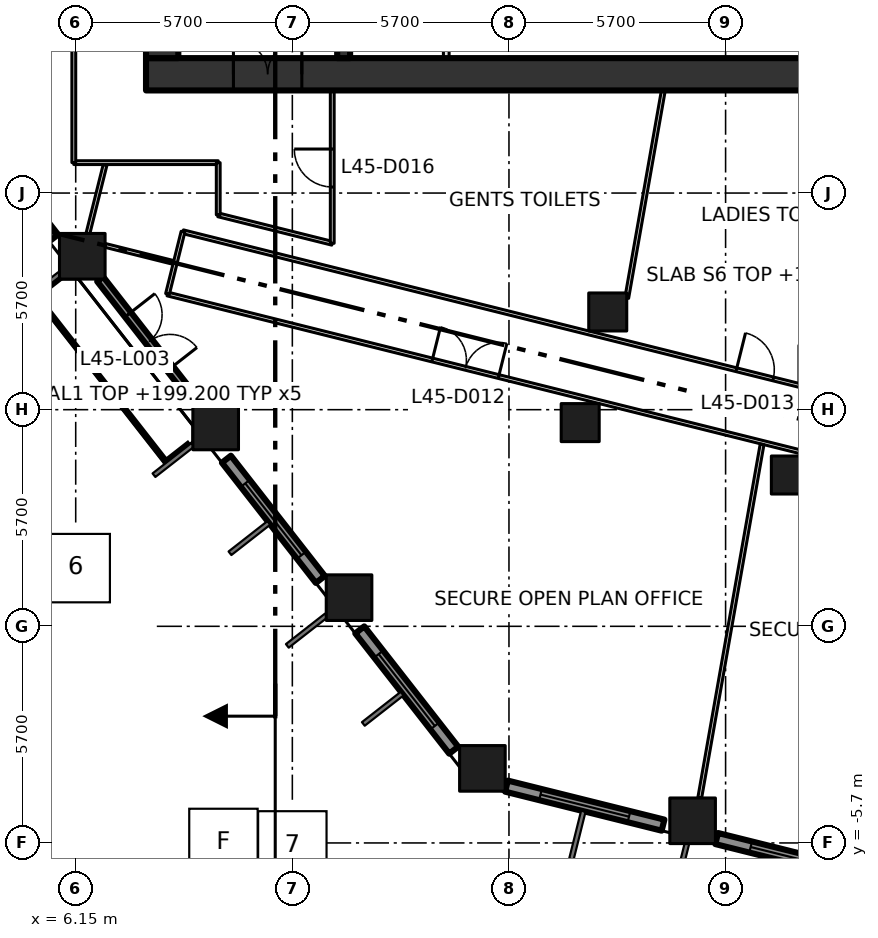
"""IFC4 building model, lengths in metres.
Left out: names, types, materials, properties, quantities, classifications, styles, units other than length and angle.
Written with IfcOpenShell. Run it as: python <this file> out.ifc"""

import sys

from ifc_helpers import new_model, si_unit, direction, frame, frame_2d, origin, origin_2d, place, context, subcontext, project, spatial, rectangle, extrude, element, fill, save


model = new_model("IFC4")
c1 = context("Model", 3, precision=1e-05, world=origin(), true_north=direction((0.0, 1.0)))
c2 = subcontext(c1, "Body", "Model", "MODEL_VIEW")
j1 = project(units=[si_unit("LENGTHUNIT", "METRE"), si_unit("PLANEANGLEUNIT", "RADIAN")], contexts=[c1])
p1 = place(None, origin())
s1 = spatial("IfcSite", under=j1, at=p1, CompositionType="ELEMENT")
p2 = place(p1, origin())
s2 = spatial("IfcBuilding", under=s1, at=p2, CompositionType="ELEMENT")
p3 = place(p2, frame((0.0, 0.0, 199.2)))
s3 = spatial("IfcBuildingStorey", under=s2, at=p3, CompositionType="ELEMENT", Elevation=199.2)
for number, where, z_axis, x_axis in (
    (1, (16.851, -3.738, 0.0), (0.0, 0.0, 1.0), (1.0, 0.0, 0.0)),
    (2, (13.342, 0.754, 0.0), (0.0, 0.0, 1.0), (1.0, 0.0, 0.0)),
    (3, (9.833, 5.245, 0.0), (0.0, 0.0, 1.0), (1.0, 0.0, 0.0)),
    (4, (6.323, 9.737, 0.0), (0.0, 0.0, 1.0), (1.0, 0.0, 0.0)),
    (5, (22.382, -5.117, 0.0), (0.0, 0.0, 1.0), (1.0, 0.0, 0.0)),
):
    element("IfcColumn", number, at=place(p3, frame(where, z_axis=z_axis, x_axis=x_axis)), inside=s3, PredefinedType="COLUMN", context=c2, shape_type="SweptSolid", body=[
        extrude(rectangle(XDim=1.2, YDim=1.2, at=origin_2d()), origin(), (0.0, 0.0, 1.0), 4.2),
    ])
for number, where, z_axis, x_axis in (
    (6, (19.424, 5.36, 0.0), (0.0, 0.0, 1.0), (1.0, 0.0, 0.0)),
    (7, (24.954, 3.981, 0.0), (0.0, 0.0, 1.0), (1.0, 0.0, 0.0)),
    (8, (20.149, 8.271, 0.0), (0.0, 0.0, 1.0), (1.0, 0.0, 0.0)),
):
    element("IfcColumn", number, at=place(p3, frame(where, z_axis=z_axis, x_axis=x_axis)), inside=s3, PredefinedType="COLUMN", context=c2, shape_type="SweptSolid", body=[
        extrude(rectangle(XDim=1.0, YDim=1.0, at=origin_2d()), origin(), (0.0, 0.0, 1.0), 4.2),
    ])
p4 = place(p3, frame((8.0, 14.525, -0.3), z_axis=(0.0, 0.0, 1.0), x_axis=(1.0, 0.0, 0.0)))
e9 = element("IfcWall", 9, at=p4, inside=s3, PredefinedType="SHEAR", context=c2, shape_type="SweptSolid", body=[
    extrude(rectangle(XDim=22.8, YDim=0.85, at=frame_2d((11.4, 0.0))), origin(), (0.0, 0.0, 1.0), 4.2),
])
p5 = place(p4, frame((2.3, 0.0, 0.3)))
e10 = element("IfcOpeningElement", 10, at=p5, cuts=e9, PredefinedType="OPENING", context=c2, shape_type="SweptSolid", body=[
    extrude(rectangle(XDim=1.8, YDim=2.1, at=frame_2d((0.9, 1.05))), frame((0.0, 0.435, 0.0), z_axis=(0.0, -1.0, 0.0), x_axis=(1.0, 0.0, 0.0)), (0.0, 0.0, 1.0), 0.87),
])
p6 = place(p3, frame((8.425, 14.95, -0.3), z_axis=(0.0, 0.0, 1.0), x_axis=(0.0, 1.0, 0.0)))
e11 = element("IfcWall", 11, at=p6, inside=s3, PredefinedType="SHEAR", context=c2, shape_type="SweptSolid", body=[
    extrude(rectangle(XDim=20.75, YDim=0.85, at=frame_2d((10.375, 0.0))), origin(), (0.0, 0.0, 1.0), 4.2),
])
p7 = place(p3, frame((13.2, 14.95, 0.0), z_axis=(0.0, 0.0, 1.0), x_axis=(0.0, 1.0, 0.0)))
e12 = element("IfcWall", 12, at=p7, inside=s3, PredefinedType="SHEAR", context=c2, shape_type="SweptSolid", body=[
    extrude(rectangle(XDim=20.75, YDim=0.34, at=frame_2d((10.375, 0.0))), origin(), (0.0, 0.0, 1.0), 3.9),
])
p8 = place(p7, frame((3.35, 0.0, 0.0)))
e13 = element("IfcOpeningElement", 13, at=p8, cuts=e12, PredefinedType="OPENING", context=c2, shape_type="SweptSolid", body=[
    extrude(rectangle(XDim=1.8, YDim=2.1, at=frame_2d((0.9, 1.05))), frame((0.0, 0.18, 0.0), z_axis=(0.0, -1.0, 0.0), x_axis=(1.0, 0.0, 0.0)), (0.0, 0.0, 1.0), 0.36),
])
p9 = place(p7, frame((11.45, 0.0, 0.0)))
e14 = element("IfcOpeningElement", 14, at=p9, cuts=e12, PredefinedType="OPENING", context=c2, shape_type="SweptSolid", body=[
    extrude(rectangle(XDim=1.2, YDim=2.1, at=frame_2d((0.6, 1.05))), frame((0.0, 0.18, 0.0), z_axis=(0.0, -1.0, 0.0), x_axis=(1.0, 0.0, 0.0)), (0.0, 0.0, 1.0), 0.36),
])
p10 = place(p3, frame((15.9, 14.95, 0.0), z_axis=(0.0, 0.0, 1.0), x_axis=(0.0, 1.0, 0.0)))
e15 = element("IfcWall", 15, at=p10, inside=s3, PredefinedType="PARTITIONING", context=c2, shape_type="SweptSolid", body=[
    extrude(rectangle(XDim=2.675, YDim=0.15, at=frame_2d((1.337, 0.0))), origin(), (0.0, 0.0, 1.0), 3.9),
])
p11 = place(p3, frame((3.096, 13.381, 0.0), z_axis=(0.0, 0.0, 1.0), x_axis=(0.615563820493, -0.78808704018, 0.0)))
e16 = element("IfcWall", 16, at=p11, inside=s3, PredefinedType="SOLIDWALL", context=c2, shape_type="SweptSolid", body=[
    extrude(rectangle(XDim=4.016, YDim=0.3, at=frame_2d((2.008, 0.0))), origin(), (0.0, 0.0, 1.0), 3.15),
])
p12 = place(p11, frame((0.808, 0.0, 0.8)))
e17 = element("IfcOpeningElement", 17, at=p12, cuts=e16, PredefinedType="OPENING", context=c2, shape_type="SweptSolid", body=[
    extrude(rectangle(XDim=2.4, YDim=2.1, at=frame_2d((1.2, 1.05))), frame((0.0, 0.16, 0.0), z_axis=(0.0, -1.0, 0.0), x_axis=(1.0, 0.0, 0.0)), (0.0, 0.0, 1.0), 0.32),
])
p13 = place(p3, frame((6.793, 9.137, 0.0), z_axis=(0.0, 0.0, 1.0), x_axis=(0.615521537177, -0.788120065264, 0.0)))
e18 = element("IfcWall", 18, at=p13, inside=s3, PredefinedType="SOLIDWALL", context=c2, shape_type="SweptSolid", body=[
    extrude(rectangle(XDim=4.177, YDim=0.2, at=frame_2d((2.088, 0.0))), origin(), (0.0, 0.0, 1.0), 3.15),
])
p14 = place(p13, frame((1.188, 0.0, 0.0)))
e19 = element("IfcOpeningElement", 19, at=p14, cuts=e18, PredefinedType="OPENING", context=c2, shape_type="SweptSolid", body=[
    extrude(rectangle(XDim=1.8, YDim=2.9, at=frame_2d((0.9, 1.45))), frame((0.0, 0.11, 0.0), z_axis=(0.0, -1.0, 0.0), x_axis=(1.0, 0.0, 0.0)), (0.0, 0.0, 1.0), 0.22),
])
p15 = place(p3, frame((10.115, 4.397, 0.0), z_axis=(0.0, 0.0, 1.0), x_axis=(0.615644041972, -0.788024373725, 0.0)))
e20 = element("IfcWall", 20, at=p15, inside=s3, PredefinedType="SOLIDWALL", context=c2, shape_type="SweptSolid", body=[
    extrude(rectangle(XDim=4.015, YDim=0.3, at=frame_2d((2.008, 0.0))), origin(), (0.0, 0.0, 1.0), 3.15),
])
p16 = place(p15, frame((0.807, 0.0, 0.8)))
e21 = element("IfcOpeningElement", 21, at=p16, cuts=e20, PredefinedType="OPENING", context=c2, shape_type="SweptSolid", body=[
    extrude(rectangle(XDim=2.4, YDim=2.1, at=frame_2d((1.2, 1.05))), frame((0.0, 0.16, 0.0), z_axis=(0.0, -1.0, 0.0), x_axis=(1.0, 0.0, 0.0)), (0.0, 0.0, 1.0), 0.32),
])
p17 = place(p3, frame((13.624, -0.094, 0.0), z_axis=(0.0, 0.0, 1.0), x_axis=(0.615526062586, -0.7881165309, 0.0)))
e22 = element("IfcWall", 22, at=p17, inside=s3, PredefinedType="SOLIDWALL", context=c2, shape_type="SweptSolid", body=[
    extrude(rectangle(XDim=4.016, YDim=0.3, at=frame_2d((2.008, 0.0))), origin(), (0.0, 0.0, 1.0), 3.15),
])
p18 = place(p17, frame((0.808, 0.0, 0.8)))
e23 = element("IfcOpeningElement", 23, at=p18, cuts=e22, PredefinedType="OPENING", context=c2, shape_type="SweptSolid", body=[
    extrude(rectangle(XDim=2.4, YDim=2.1, at=frame_2d((1.2, 1.05))), frame((0.0, 0.16, 0.0), z_axis=(0.0, -1.0, 0.0), x_axis=(1.0, 0.0, 0.0)), (0.0, 0.0, 1.0), 0.32),
])
p19 = place(p3, frame((17.484, -4.205, 0.0), z_axis=(0.0, 0.0, 1.0), x_axis=(0.970318118028, -0.241832069473, 0.0)))
e24 = element("IfcWall", 24, at=p19, inside=s3, PredefinedType="SOLIDWALL", context=c2, shape_type="SweptSolid", body=[
    extrude(rectangle(XDim=4.246, YDim=0.3, at=frame_2d((2.123, 0.0))), origin(), (0.0, 0.0, 1.0), 3.15),
])
p20 = place(p19, frame((0.923, 0.0, 0.8)))
e25 = element("IfcOpeningElement", 25, at=p20, cuts=e24, PredefinedType="OPENING", context=c2, shape_type="SweptSolid", body=[
    extrude(rectangle(XDim=2.4, YDim=2.1, at=frame_2d((1.2, 1.05))), frame((0.0, 0.16, 0.0), z_axis=(0.0, -1.0, 0.0), x_axis=(1.0, 0.0, 0.0)), (0.0, 0.0, 1.0), 0.32),
])
p21 = place(p3, frame((23.015, -5.584, 0.0), z_axis=(0.0, 0.0, 1.0), x_axis=(0.970291164166, -0.241940192487, 0.0)))
e26 = element("IfcWall", 26, at=p21, inside=s3, PredefinedType="SOLIDWALL", context=c2, shape_type="SweptSolid", body=[
    extrude(rectangle(XDim=4.245, YDim=0.3, at=frame_2d((2.123, 0.0))), origin(), (0.0, 0.0, 1.0), 3.15),
])
p22 = place(p21, frame((0.922, 0.0, 0.8)))
e27 = element("IfcOpeningElement", 27, at=p22, cuts=e26, PredefinedType="OPENING", context=c2, shape_type="SweptSolid", body=[
    extrude(rectangle(XDim=2.4, YDim=2.1, at=frame_2d((1.2, 1.05))), frame((0.0, 0.16, 0.0), z_axis=(0.0, -1.0, 0.0), x_axis=(1.0, 0.0, 0.0)), (0.0, 0.0, 1.0), 0.32),
])
p23 = place(p3, frame((6.1, 12.2, 0.0), z_axis=(0.0, 0.0, 1.0), x_axis=(1.0, 0.0, 0.0)))
e28 = element("IfcWall", 28, at=p23, inside=s3, PredefinedType="PARTITIONING", context=c2, shape_type="SweptSolid", body=[
    extrude(rectangle(XDim=3.8, YDim=0.1, at=frame_2d((1.9, 0.0))), origin(), (0.0, 0.0, 1.0), 3.9),
])
p24 = place(p3, frame((6.1, 38.9, 0.0), z_axis=(0.0, 0.0, 1.0), x_axis=(0.0, -1.0, 0.0)))
e29 = element("IfcWall", 29, at=p24, inside=s3, PredefinedType="PARTITIONING", context=c2, shape_type="SweptSolid", body=[
    extrude(rectangle(XDim=26.7, YDim=0.1, at=frame_2d((13.35, 0.0))), origin(), (0.0, 0.0, 1.0), 3.9),
])
p25 = place(p24, frame((21.01, 0.0, 0.0)))
e30 = element("IfcOpeningElement", 30, at=p25, cuts=e29, PredefinedType="OPENING", context=c2, shape_type="SweptSolid", body=[
    extrude(rectangle(XDim=1.0, YDim=2.1, at=frame_2d((0.5, 1.05))), frame((0.0, 0.06, 0.0), z_axis=(0.0, -1.0, 0.0), x_axis=(1.0, 0.0, 0.0)), (0.0, 0.0, 1.0), 0.12),
])
p26 = place(p3, frame((8.565, 8.744, 0.0), z_axis=(0.0, 0.0, 1.0), x_axis=(0.970297321886, -0.241915495869, 0.0)))
e31 = element("IfcWall", 31, at=p26, inside=s3, PredefinedType="PARTITIONING", context=c2, shape_type="SweptSolid", body=[
    extrude(rectangle(XDim=56.974, YDim=0.1, at=frame_2d((28.487, 0.0))), origin(), (0.0, 0.0, 1.0), 3.9),
])
p27 = place(p26, frame((36.514, 0.0, 0.0)))
e32 = element("IfcOpeningElement", 32, at=p27, cuts=e31, PredefinedType="OPENING", context=c2, shape_type="SweptSolid", body=[
    extrude(rectangle(XDim=1.8, YDim=2.1, at=frame_2d((0.9, 1.05))), frame((0.0, 0.06, 0.0), z_axis=(0.0, -1.0, 0.0), x_axis=(1.0, 0.0, 0.0)), (0.0, 0.0, 1.0), 0.12),
])
p28 = place(p26, frame((41.914, 0.0, 0.0)))
e33 = element("IfcOpeningElement", 33, at=p28, cuts=e31, PredefinedType="OPENING", context=c2, shape_type="SweptSolid", body=[
    extrude(rectangle(XDim=1.0, YDim=2.1, at=frame_2d((0.5, 1.05))), frame((0.0, 0.06, 0.0), z_axis=(0.0, -1.0, 0.0), x_axis=(1.0, 0.0, 0.0)), (0.0, 0.0, 1.0), 0.12),
])
p29 = place(p26, frame((53.113, 0.0, 0.0)))
e34 = element("IfcOpeningElement", 34, at=p29, cuts=e31, PredefinedType="OPENING", context=c2, shape_type="SweptSolid", body=[
    extrude(rectangle(XDim=1.0, YDim=2.1, at=frame_2d((0.5, 1.05))), frame((0.0, 0.06, 0.0), z_axis=(0.0, -1.0, 0.0), x_axis=(1.0, 0.0, 0.0)), (0.0, 0.0, 1.0), 0.12),
])
p30 = place(p26, frame((18.413, 0.0, 0.0)))
e35 = element("IfcOpeningElement", 35, at=p30, cuts=e31, PredefinedType="OPENING", context=c2, shape_type="SweptSolid", body=[
    extrude(rectangle(XDim=1.0, YDim=2.1, at=frame_2d((0.5, 1.05))), frame((0.0, 0.06, 0.0), z_axis=(0.0, -1.0, 0.0), x_axis=(1.0, 0.0, 0.0)), (0.0, 0.0, 1.0), 0.12),
])
p31 = place(p26, frame((24.114, 0.0, 0.0)))
e36 = element("IfcOpeningElement", 36, at=p31, cuts=e31, PredefinedType="OPENING", context=c2, shape_type="SweptSolid", body=[
    extrude(rectangle(XDim=1.0, YDim=2.1, at=frame_2d((0.5, 1.05))), frame((0.0, 0.06, 0.0), z_axis=(0.0, -1.0, 0.0), x_axis=(1.0, 0.0, 0.0)), (0.0, 0.0, 1.0), 0.12),
])
p32 = place(p26, frame((7.18, 0.0, 0.0)))
e37 = element("IfcOpeningElement", 37, at=p32, cuts=e31, PredefinedType="OPENING", context=c2, shape_type="SweptSolid", body=[
    extrude(rectangle(XDim=1.8, YDim=2.1, at=frame_2d((0.9, 1.05))), frame((0.0, 0.06, 0.0), z_axis=(0.0, -1.0, 0.0), x_axis=(1.0, 0.0, 0.0)), (0.0, 0.0, 1.0), 0.12),
])
p33 = place(p3, frame((8.973, 10.382, 0.0), z_axis=(0.0, 0.0, 1.0), x_axis=(0.970286808807, -0.241957658808, 0.0)))
e38 = element("IfcWall", 38, at=p33, inside=s3, PredefinedType="PARTITIONING", context=c2, shape_type="SweptSolid", body=[
    extrude(rectangle(XDim=19.88, YDim=0.1, at=frame_2d((9.94, 0.0))), origin(), (0.0, 0.0, 1.0), 3.9),
])
p34 = place(p33, frame((15.006, 0.0, 0.0)))
e39 = element("IfcOpeningElement", 39, at=p34, cuts=e38, PredefinedType="OPENING", context=c2, shape_type="SweptSolid", body=[
    extrude(rectangle(XDim=1.0, YDim=2.1, at=frame_2d((0.5, 1.05))), frame((0.0, 0.06, 0.0), z_axis=(0.0, -1.0, 0.0), x_axis=(1.0, 0.0, 0.0)), (0.0, 0.0, 1.0), 0.12),
])
p35 = place(p3, frame((8.973, 10.382, 0.0), z_axis=(0.0, 0.0, 1.0), x_axis=(-0.241650823739, -0.970363271866, 0.0)))
e40 = element("IfcWall", 40, at=p35, inside=s3, PredefinedType="PARTITIONING", context=c2, shape_type="SweptSolid", body=[
    extrude(rectangle(XDim=1.688, YDim=0.1, at=frame_2d((0.844, 0.0))), origin(), (0.0, 0.0, 1.0), 3.9),
])
p36 = place(p3, frame((9.9, 10.826, 0.0), z_axis=(0.0, 0.0, 1.0), x_axis=(0.970290953223, -0.241941038466, 0.0)))
e41 = element("IfcWall", 41, at=p36, inside=s3, PredefinedType="PARTITIONING", context=c2, shape_type="SweptSolid", body=[
    extrude(rectangle(XDim=3.092, YDim=0.1, at=frame_2d((1.546, 0.0))), origin(), (0.0, 0.0, 1.0), 3.9),
])
p37 = place(p3, frame((9.9, 12.2, 0.0), z_axis=(0.0, 0.0, 1.0), x_axis=(0.0, -1.0, 0.0)))
e42 = element("IfcWall", 42, at=p37, inside=s3, PredefinedType="PARTITIONING", context=c2, shape_type="SweptSolid", body=[
    extrude(rectangle(XDim=1.374, YDim=0.1, at=frame_2d((0.687, 0.0))), origin(), (0.0, 0.0, 1.0), 3.9),
])
p38 = place(p3, frame((12.9, 10.078, 0.0), z_axis=(0.0, 0.0, 1.0), x_axis=(0.0, 1.0, 0.0)))
e43 = element("IfcWall", 43, at=p38, inside=s3, PredefinedType="PARTITIONING", context=c2, shape_type="SweptSolid", body=[
    extrude(rectangle(XDim=4.022, YDim=0.1, at=frame_2d((2.011, 0.0))), origin(), (0.0, 0.0, 1.0), 3.9),
])
p39 = place(p38, frame((1.48, 0.0, 0.0)))
e44 = element("IfcOpeningElement", 44, at=p39, cuts=e43, PredefinedType="OPENING", context=c2, shape_type="SweptSolid", body=[
    extrude(rectangle(XDim=1.0, YDim=2.1, at=frame_2d((0.5, 1.05))), frame((0.0, 0.06, 0.0), z_axis=(0.0, -1.0, 0.0), x_axis=(1.0, 0.0, 0.0)), (0.0, 0.0, 1.0), 0.12),
])
p40 = place(p3, frame((6.922, 12.138, 0.0), z_axis=(0.0, 0.0, 1.0), x_axis=(-0.242504681353, -0.970150235542, 0.0)))
e45 = element("IfcWall", 45, at=p40, inside=s3, PredefinedType="PARTITIONING", context=c2, shape_type="SweptSolid", body=[
    extrude(rectangle(XDim=1.856, YDim=0.1, at=frame_2d((0.928, 0.0))), origin(), (0.0, 0.0, 1.0), 3.9),
])
p41 = place(p3, frame((8.72, 9.574, 0.0), z_axis=(0.0, 0.0, 1.0), x_axis=(-0.97017350799, 0.242411559945, 0.0)))
e46 = element("IfcWall", 46, at=p41, inside=s3, PredefinedType="PARTITIONING", context=c2, shape_type="SweptSolid", body=[
    extrude(rectangle(XDim=1.852, YDim=0.1, at=frame_2d((0.926, 0.0))), origin(), (0.0, 0.0, 1.0), 3.9),
])
p42 = place(p3, frame((20.649, 8.637, 0.0), z_axis=(0.0, 0.0, 1.0), x_axis=(0.173619629197, 0.984812786451, 0.0)))
e47 = element("IfcWall", 47, at=p42, inside=s3, PredefinedType="PARTITIONING", context=c2, shape_type="SweptSolid", body=[
    extrude(rectangle(XDim=5.547, YDim=0.1, at=frame_2d((2.774, 0.0))), origin(), (0.0, 0.0, 1.0), 3.9),
])
p43 = place(p3, frame((22.569, -4.517, 0.0), z_axis=(0.0, 0.0, 1.0), x_axis=(0.173660042162, 0.984805660908, 0.0)))
e48 = element("IfcWall", 48, at=p43, inside=s3, PredefinedType="PARTITIONING", context=c2, shape_type="SweptSolid", body=[
    extrude(rectangle(XDim=9.449, YDim=0.1, at=frame_2d((4.724, 0.0))), origin(), (0.0, 0.0, 1.0), 3.9),
])
p44 = place(p5, origin())
e49 = element("IfcDoor", 49, at=p44, inside=s3, OperationType="DOUBLE_DOOR_SINGLE_SWING", PredefinedType="DOOR", context=c2, shape_type="SweptSolid", body=[
    extrude(rectangle(XDim=1.8, YDim=2.1, at=frame_2d((0.9, 1.05))), frame((0.0, 0.025, 0.0), z_axis=(0.0, -1.0, 0.0), x_axis=(1.0, 0.0, 0.0)), (0.0, 0.0, 1.0), 0.05),
])
fill(e10, e49)
p45 = place(p14, origin())
e50 = element("IfcDoor", 50, at=p45, inside=s3, OperationType="DOUBLE_DOOR_SINGLE_SWING", PredefinedType="DOOR", context=c2, shape_type="SweptSolid", body=[
    extrude(rectangle(XDim=1.8, YDim=2.9, at=frame_2d((0.9, 1.45))), frame((0.0, 0.025, 0.0), z_axis=(0.0, -1.0, 0.0), x_axis=(1.0, 0.0, 0.0)), (0.0, 0.0, 1.0), 0.05),
])
fill(e19, e50)
p46 = place(p16, origin())
e51 = element("IfcWindow", 51, at=p46, inside=s3, PartitioningType="DOUBLE_PANEL_VERTICAL", PredefinedType="WINDOW", context=c2, shape_type="SweptSolid", body=[
    extrude(rectangle(XDim=2.4, YDim=2.1, at=frame_2d((1.2, 1.05))), frame((0.0, 0.03, 0.0), z_axis=(0.0, -1.0, 0.0), x_axis=(1.0, 0.0, 0.0)), (0.0, 0.0, 1.0), 0.06),
])
fill(e21, e51)
p47 = place(p18, origin())
e52 = element("IfcWindow", 52, at=p47, inside=s3, PartitioningType="DOUBLE_PANEL_VERTICAL", PredefinedType="WINDOW", context=c2, shape_type="SweptSolid", body=[
    extrude(rectangle(XDim=2.4, YDim=2.1, at=frame_2d((1.2, 1.05))), frame((0.0, 0.03, 0.0), z_axis=(0.0, -1.0, 0.0), x_axis=(1.0, 0.0, 0.0)), (0.0, 0.0, 1.0), 0.06),
])
fill(e23, e52)
p48 = place(p20, origin())
e53 = element("IfcWindow", 53, at=p48, inside=s3, PartitioningType="DOUBLE_PANEL_VERTICAL", PredefinedType="WINDOW", context=c2, shape_type="SweptSolid", body=[
    extrude(rectangle(XDim=2.4, YDim=2.1, at=frame_2d((1.2, 1.05))), frame((0.0, 0.03, 0.0), z_axis=(0.0, -1.0, 0.0), x_axis=(1.0, 0.0, 0.0)), (0.0, 0.0, 1.0), 0.06),
])
fill(e25, e53)
p49 = place(p22, origin())
e54 = element("IfcWindow", 54, at=p49, inside=s3, PartitioningType="DOUBLE_PANEL_VERTICAL", PredefinedType="WINDOW", context=c2, shape_type="SweptSolid", body=[
    extrude(rectangle(XDim=2.4, YDim=2.1, at=frame_2d((1.2, 1.05))), frame((0.0, 0.03, 0.0), z_axis=(0.0, -1.0, 0.0), x_axis=(1.0, 0.0, 0.0)), (0.0, 0.0, 1.0), 0.06),
])
fill(e27, e54)
p50 = place(p32, origin())
e55 = element("IfcDoor", 55, at=p50, inside=s3, OperationType="DOUBLE_DOOR_SINGLE_SWING", PredefinedType="DOOR", context=c2, shape_type="SweptSolid", body=[
    extrude(rectangle(XDim=1.8, YDim=2.1, at=frame_2d((0.9, 1.05))), frame((0.0, 0.025, 0.0), z_axis=(0.0, -1.0, 0.0), x_axis=(1.0, 0.0, 0.0)), (0.0, 0.0, 1.0), 0.05),
])
fill(e37, e55)
p51 = place(p34, origin())
e56 = element("IfcDoor", 56, at=p51, inside=s3, OperationType="SINGLE_SWING_LEFT", PredefinedType="DOOR", context=c2, shape_type="SweptSolid", body=[
    extrude(rectangle(XDim=1.0, YDim=2.1, at=frame_2d((0.5, 1.05))), frame((0.0, 0.025, 0.0), z_axis=(0.0, -1.0, 0.0), x_axis=(1.0, 0.0, 0.0)), (0.0, 0.0, 1.0), 0.05),
])
fill(e39, e56)
p52 = place(p39, origin())
e57 = element("IfcDoor", 57, at=p52, inside=s3, OperationType="SINGLE_SWING_RIGHT", PredefinedType="DOOR", context=c2, shape_type="SweptSolid", body=[
    extrude(rectangle(XDim=1.0, YDim=2.1, at=frame_2d((0.5, 1.05))), frame((0.0, 0.025, 0.0), z_axis=(0.0, -1.0, 0.0), x_axis=(1.0, 0.0, 0.0)), (0.0, 0.0, 1.0), 0.05),
])
fill(e44, e57)
save(model, sys.argv[1])
